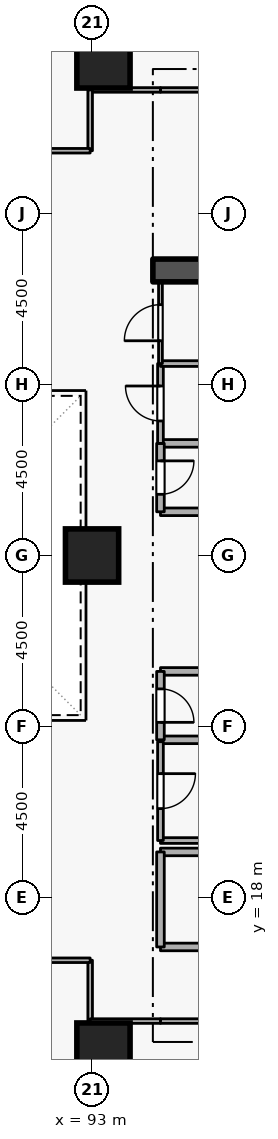
"""IFC4 building model, lengths in metres.
Left out: names, types, materials, properties, quantities, classifications, styles, units other than length and angle.
Written with IfcOpenShell. Run it as: python <this file> out.ifc"""

import sys

from ifc_helpers import new_model, si_unit, direction, frame, frame_2d, origin, origin_2d, place, context, subcontext, project, spatial, rectangle, extrude, element, fill, save


model = new_model("IFC4")
c1 = context("Model", 3, precision=1e-05, world=origin(), true_north=direction((0.0, 1.0)))
c2 = subcontext(c1, "Body", "Model", "MODEL_VIEW")
j1 = project(units=[si_unit("LENGTHUNIT", "METRE"), si_unit("PLANEANGLEUNIT", "RADIAN")], contexts=[c1])
p1 = place(None, origin())
s1 = spatial("IfcSite", under=j1, at=p1, CompositionType="ELEMENT")
p2 = place(p1, origin())
s2 = spatial("IfcBuilding", under=s1, at=p2, CompositionType="ELEMENT")
p3 = place(p2, frame((0.0, 0.0, 35.1)))
s3 = spatial("IfcBuildingStorey", under=s2, at=p3, CompositionType="ELEMENT", Elevation=35.1)
p4 = place(p3, frame((94.6, 34.5, 0.0), z_axis=(0.0, 0.0, 1.0), x_axis=(1.0, 0.0, 0.0)))
e1 = element("IfcWall", 1, at=p4, inside=s3, PredefinedType="SHEAR", context=c2, shape_type="SweptSolid", body=[
    extrude(rectangle(XDim=5.7, YDim=0.6, at=frame_2d((2.85, 0.0))), origin(), (0.0, 0.0, 1.0), 3.6),
])
for number, where, z_axis, x_axis in (
    (2, (93.3, 14.0, 0.0), (0.0, 0.0, 1.0), (1.0, 0.0, 0.0)),
    (3, (93.3, 40.0, 0.0), (0.0, 0.0, 1.0), (1.0, 0.0, 0.0)),
    (4, (93.0, 27.0, 0.0), (0.0, 0.0, 1.0), (1.0, 0.0, 0.0)),
):
    element("IfcColumn", number, at=place(p3, frame(where, z_axis=z_axis, x_axis=x_axis)), inside=s3, PredefinedType="COLUMN", context=c2, shape_type="SweptSolid", body=[
        extrude(rectangle(XDim=1.4, YDim=1.4, at=origin_2d()), origin(), (0.0, 0.0, 1.0), 3.6),
    ])
p5 = place(p3, frame((94.8, 16.7, 0.0), z_axis=(0.0, 0.0, 1.0), x_axis=(1.0, 0.0, 0.0)))
e5 = element("IfcWall", 5, at=p5, inside=s3, PredefinedType="STANDARD", context=c2, shape_type="SweptSolid", body=[
    extrude(rectangle(XDim=5.7, YDim=0.2, at=frame_2d((2.85, 0.0))), origin(), (0.0, 0.0, 1.0), 3.34),
])
p6 = place(p5, frame((2.275, 0.0, 0.0)))
e6 = element("IfcOpeningElement", 6, at=p6, cuts=e5, PredefinedType="OPENING", context=c2, shape_type="SweptSolid", body=[
    extrude(rectangle(XDim=1.15, YDim=2.1, at=frame_2d((0.575, 1.05))), frame((0.0, 0.11, 0.0), z_axis=(0.0, -1.0, 0.0), x_axis=(1.0, 0.0, 0.0)), (0.0, 0.0, 1.0), 0.22),
])
p7 = place(p3, frame((97.1, 19.2, 0.0), z_axis=(0.0, 0.0, 1.0), x_axis=(-1.0, 0.0, 0.0)))
e7 = element("IfcWall", 7, at=p7, inside=s3, PredefinedType="STANDARD", context=c2, shape_type="SweptSolid", body=[
    extrude(rectangle(XDim=2.3, YDim=0.2, at=frame_2d((1.15, 0.0))), origin(), (0.0, 0.0, 1.0), 2.545),
])
p8 = place(p3, frame((94.8, 19.2, 0.0), z_axis=(0.0, 0.0, 1.0), x_axis=(0.0, -1.0, 0.0)))
e8 = element("IfcWall", 8, at=p8, inside=s3, PredefinedType="STANDARD", context=c2, shape_type="SweptSolid", body=[
    extrude(rectangle(XDim=2.5, YDim=0.2, at=frame_2d((1.25, 0.0))), origin(), (0.0, 0.0, 1.0), 3.34),
])
for number, where, z_axis, x_axis in (
    (9, (94.8, 28.15, 0.0), (0.0, 0.0, 1.0), (1.0, 0.0, 0.0)),
    (10, (96.85, 29.95, 0.0), (0.0, 0.0, 1.0), (-1.0, 0.0, 0.0)),
):
    element("IfcWall", number, at=place(p3, frame(where, z_axis=z_axis, x_axis=x_axis)), inside=s3, PredefinedType="STANDARD", context=c2, shape_type="SweptSolid", body=[
        extrude(rectangle(XDim=2.05, YDim=0.2, at=frame_2d((1.025, 0.0))), origin(), (0.0, 0.0, 1.0), 3.34),
    ])
p9 = place(p3, frame((94.8, 29.95, 0.0), z_axis=(0.0, 0.0, 1.0), x_axis=(0.0, -1.0, 0.0)))
e11 = element("IfcWall", 11, at=p9, inside=s3, PredefinedType="STANDARD", context=c2, shape_type="SweptSolid", body=[
    extrude(rectangle(XDim=1.8, YDim=0.2, at=frame_2d((0.9, 0.0))), origin(), (0.0, 0.0, 1.0), 3.34),
])
p10 = place(p9, frame((0.46, 0.0, 0.0)))
e12 = element("IfcOpeningElement", 12, at=p10, cuts=e11, PredefinedType="OPENING", context=c2, shape_type="SweptSolid", body=[
    extrude(rectangle(XDim=0.88, YDim=2.04, at=frame_2d((0.44, 1.02))), frame((0.0, 0.11, 0.0), z_axis=(0.0, -1.0, 0.0), x_axis=(1.0, 0.0, 0.0)), (0.0, 0.0, 1.0), 0.22),
])
for number, where, z_axis, x_axis in (
    (13, (94.8, 22.15, 0.0), (0.0, 0.0, 1.0), (1.0, 0.0, 0.0)),
    (14, (96.85, 23.95, 0.0), (0.0, 0.0, 1.0), (-1.0, 0.0, 0.0)),
):
    element("IfcWall", number, at=place(p3, frame(where, z_axis=z_axis, x_axis=x_axis)), inside=s3, PredefinedType="STANDARD", context=c2, shape_type="SweptSolid", body=[
        extrude(rectangle(XDim=2.05, YDim=0.2, at=frame_2d((1.025, 0.0))), origin(), (0.0, 0.0, 1.0), 3.34),
    ])
p11 = place(p3, frame((94.8, 23.95, 0.0), z_axis=(0.0, 0.0, 1.0), x_axis=(0.0, -1.0, 0.0)))
e15 = element("IfcWall", 15, at=p11, inside=s3, PredefinedType="STANDARD", context=c2, shape_type="SweptSolid", body=[
    extrude(rectangle(XDim=1.8, YDim=0.2, at=frame_2d((0.9, 0.0))), origin(), (0.0, 0.0, 1.0), 3.34),
])
p12 = place(p11, frame((0.46, 0.0, 0.0)))
e16 = element("IfcOpeningElement", 16, at=p12, cuts=e15, PredefinedType="OPENING", context=c2, shape_type="SweptSolid", body=[
    extrude(rectangle(XDim=0.88, YDim=2.04, at=frame_2d((0.44, 1.02))), frame((0.0, 0.11, 0.0), z_axis=(0.0, -1.0, 0.0), x_axis=(1.0, 0.0, 0.0)), (0.0, 0.0, 1.0), 0.22),
])
p13 = place(p3, frame((94.8, 19.5, 0.0), z_axis=(0.0, 0.0, 1.0), x_axis=(1.0, 0.0, 0.0)))
e17 = element("IfcWall", 17, at=p13, inside=s3, PredefinedType="PARTITIONING", context=c2, shape_type="SweptSolid", body=[
    extrude(rectangle(XDim=2.05, YDim=0.15, at=frame_2d((1.025, 0.0))), origin(), (0.0, 0.0, 1.0), 2.545),
])
p14 = place(p3, frame((94.8, 22.1, 0.0), z_axis=(0.0, 0.0, 1.0), x_axis=(0.0, -1.0, 0.0)))
e18 = element("IfcWall", 18, at=p14, inside=s3, PredefinedType="PARTITIONING", context=c2, shape_type="SweptSolid", body=[
    extrude(rectangle(XDim=2.6, YDim=0.15, at=frame_2d((1.3, 0.0))), origin(), (0.0, 0.0, 1.0), 3.34),
])
p15 = place(p14, frame((0.84, 0.0, 0.0)))
e19 = element("IfcOpeningElement", 19, at=p15, cuts=e18, PredefinedType="OPENING", context=c2, shape_type="SweptSolid", body=[
    extrude(rectangle(XDim=0.92, YDim=2.08, at=frame_2d((0.46, 1.04))), frame((0.0, 0.085, 0.0), z_axis=(0.0, -1.0, 0.0), x_axis=(1.0, 0.0, 0.0)), (0.0, 0.0, 1.0), 0.17),
])
p16 = place(p3, frame((94.8, 29.95, 0.0), z_axis=(0.0, 0.0, 1.0), x_axis=(0.0, 1.0, 0.0)))
e20 = element("IfcWall", 20, at=p16, inside=s3, PredefinedType="PARTITIONING", context=c2, shape_type="SweptSolid", body=[
    extrude(rectangle(XDim=2.1, YDim=0.15, at=frame_2d((1.05, 0.0))), origin(), (0.0, 0.0, 1.0), 3.34),
])
p17 = place(p16, frame((0.59, 0.0, 0.0)))
e21 = element("IfcOpeningElement", 21, at=p17, cuts=e20, PredefinedType="OPENING", context=c2, shape_type="SweptSolid", body=[
    extrude(rectangle(XDim=0.92, YDim=2.08, at=frame_2d((0.46, 1.04))), frame((0.0, 0.085, 0.0), z_axis=(0.0, -1.0, 0.0), x_axis=(1.0, 0.0, 0.0)), (0.0, 0.0, 1.0), 0.17),
])
p18 = place(p3, frame((94.8, 32.05, 0.0), z_axis=(0.0, 0.0, 1.0), x_axis=(1.0, 0.0, 0.0)))
e22 = element("IfcWall", 22, at=p18, inside=s3, PredefinedType="PARTITIONING", context=c2, shape_type="SweptSolid", body=[
    extrude(rectangle(XDim=2.05, YDim=0.15, at=frame_2d((1.025, 0.0))), origin(), (0.0, 0.0, 1.0), 3.34),
])
p19 = place(p3, frame((94.8, 32.05, 0.0), z_axis=(0.0, 0.0, 1.0), x_axis=(0.0, 1.0, 0.0)))
e23 = element("IfcWall", 23, at=p19, inside=s3, PredefinedType="PARTITIONING", context=c2, shape_type="SweptSolid", body=[
    extrude(rectangle(XDim=2.15, YDim=0.1, at=frame_2d((1.075, 0.0))), origin(), (0.0, 0.0, 1.0), 3.34),
])
p20 = place(p19, frame((0.6, 0.0, 0.0)))
e24 = element("IfcOpeningElement", 24, at=p20, cuts=e23, PredefinedType="OPENING", context=c2, shape_type="SweptSolid", body=[
    extrude(rectangle(XDim=0.95, YDim=2.1, at=frame_2d((0.475, 1.05))), frame((0.0, 0.06, 0.0), z_axis=(0.0, -1.0, 0.0), x_axis=(1.0, 0.0, 0.0)), (0.0, 0.0, 1.0), 0.12),
])
p21 = place(p3, frame((92.95, 16.35, 0.0), z_axis=(0.0, 0.0, 1.0), x_axis=(0.0, -1.0, 0.0)))
e25 = element("IfcWall", 25, at=p21, inside=s3, PredefinedType="PARTITIONING", context=c2, shape_type="SweptSolid", body=[
    extrude(rectangle(XDim=1.6, YDim=0.12, at=frame_2d((0.8, 0.0))), origin(), (0.0, 0.0, 1.0), 3.34),
])
p22 = place(p3, frame((92.95, 14.75, 0.0), z_axis=(0.0, 0.0, 1.0), x_axis=(1.0, 0.0, 0.0)))
e26 = element("IfcWall", 26, at=p22, inside=s3, PredefinedType="PARTITIONING", context=c2, shape_type="SweptSolid", body=[
    extrude(rectangle(XDim=1.85, YDim=0.12, at=frame_2d((0.925, 0.0))), origin(), (0.0, 0.0, 1.0), 3.34),
])
p23 = place(p3, frame((94.8, 14.75, 0.0), z_axis=(0.0, 0.0, 1.0), x_axis=(1.0, 0.0, 0.0)))
e27 = element("IfcWall", 27, at=p23, inside=s3, PredefinedType="PARTITIONING", context=c2, shape_type="SweptSolid", body=[
    extrude(rectangle(XDim=9.35, YDim=0.12, at=frame_2d((4.675, 0.0))), origin(), (0.0, 0.0, 1.0), 3.34),
])
p24 = place(p23, frame((4.15, 0.0, 0.0)))
e28 = element("IfcOpeningElement", 28, at=p24, cuts=e27, PredefinedType="OPENING", context=c2, shape_type="SweptSolid", body=[
    extrude(rectangle(XDim=1.05, YDim=2.1, at=frame_2d((0.525, 1.05))), frame((0.0, 0.07, 0.0), z_axis=(0.0, -1.0, 0.0), x_axis=(1.0, 0.0, 0.0)), (0.0, 0.0, 1.0), 0.14),
])
p25 = place(p3, frame((88.5, 16.35, 0.0), z_axis=(0.0, 0.0, 1.0), x_axis=(1.0, 0.0, 0.0)))
e29 = element("IfcWall", 29, at=p25, inside=s3, PredefinedType="PARTITIONING", context=c2, shape_type="SweptSolid", body=[
    extrude(rectangle(XDim=4.45, YDim=0.12, at=frame_2d((2.225, 0.0))), origin(), (0.0, 0.0, 1.0), 3.34),
])
p26 = place(p3, frame((97.95, 39.25, 0.0), z_axis=(0.0, 0.0, 1.0), x_axis=(-1.0, 0.0, 0.0)))
e30 = element("IfcWall", 30, at=p26, inside=s3, PredefinedType="PARTITIONING", context=c2, shape_type="SweptSolid", body=[
    extrude(rectangle(XDim=3.15, YDim=0.12, at=frame_2d((1.575, 0.0))), origin(), (0.0, 0.0, 1.0), 3.34),
])
p27 = place(p3, frame((94.8, 39.25, 0.0), z_axis=(0.0, 0.0, 1.0), x_axis=(-1.0, 0.0, 0.0)))
e31 = element("IfcWall", 31, at=p27, inside=s3, PredefinedType="PARTITIONING", context=c2, shape_type="SweptSolid", body=[
    extrude(rectangle(XDim=1.85, YDim=0.12, at=frame_2d((0.925, 0.0))), origin(), (0.0, 0.0, 1.0), 3.34),
])
p28 = place(p3, frame((92.95, 39.25, 0.0), z_axis=(0.0, 0.0, 1.0), x_axis=(0.0, -1.0, 0.0)))
e32 = element("IfcWall", 32, at=p28, inside=s3, PredefinedType="PARTITIONING", context=c2, shape_type="SweptSolid", body=[
    extrude(rectangle(XDim=1.6, YDim=0.12, at=frame_2d((0.8, 0.0))), origin(), (0.0, 0.0, 1.0), 3.34),
])
p29 = place(p3, frame((92.95, 37.65, 0.0), z_axis=(0.0, 0.0, 1.0), x_axis=(-1.0, 0.0, 0.0)))
e33 = element("IfcWall", 33, at=p29, inside=s3, PredefinedType="PARTITIONING", context=c2, shape_type="SweptSolid", body=[
    extrude(rectangle(XDim=4.45, YDim=0.12, at=frame_2d((2.225, 0.0))), origin(), (0.0, 0.0, 1.0), 3.34),
])
p30 = place(p29, frame((1.7, 0.0, 0.0)))
e34 = element("IfcOpeningElement", 34, at=p30, cuts=e33, PredefinedType="OPENING", context=c2, shape_type="SweptSolid", body=[
    extrude(rectangle(XDim=1.05, YDim=2.1, at=frame_2d((0.525, 1.05))), frame((0.0, 0.07, 0.0), z_axis=(0.0, -1.0, 0.0), x_axis=(1.0, 0.0, 0.0)), (0.0, 0.0, 1.0), 0.14),
])
p31 = place(p10, origin())
e35 = element("IfcDoor", 35, at=p31, inside=s3, OperationType="SINGLE_SWING_LEFT", PredefinedType="DOOR", context=c2, shape_type="SweptSolid", body=[
    extrude(rectangle(XDim=0.88, YDim=2.04, at=frame_2d((0.44, 1.02))), frame((0.0, 0.025, 0.0), z_axis=(0.0, -1.0, 0.0), x_axis=(1.0, 0.0, 0.0)), (0.0, 0.0, 1.0), 0.05),
])
fill(e12, e35)
p32 = place(p12, origin())
e36 = element("IfcDoor", 36, at=p32, inside=s3, OperationType="SINGLE_SWING_RIGHT", PredefinedType="DOOR", context=c2, shape_type="SweptSolid", body=[
    extrude(rectangle(XDim=0.88, YDim=2.04, at=frame_2d((0.44, 1.02))), frame((0.0, 0.025, 0.0), z_axis=(0.0, -1.0, 0.0), x_axis=(1.0, 0.0, 0.0)), (0.0, 0.0, 1.0), 0.05),
])
fill(e16, e36)
p33 = place(p15, origin())
e37 = element("IfcDoor", 37, at=p33, inside=s3, OperationType="SINGLE_SWING_LEFT", PredefinedType="DOOR", context=c2, shape_type="SweptSolid", body=[
    extrude(rectangle(XDim=0.92, YDim=2.08, at=frame_2d((0.46, 1.04))), frame((0.0, 0.025, 0.0), z_axis=(0.0, -1.0, 0.0), x_axis=(1.0, 0.0, 0.0)), (0.0, 0.0, 1.0), 0.05),
])
fill(e19, e37)
p34 = place(p17, origin())
e38 = element("IfcDoor", 38, at=p34, inside=s3, OperationType="SINGLE_SWING_RIGHT", PredefinedType="DOOR", context=c2, shape_type="SweptSolid", body=[
    extrude(rectangle(XDim=0.92, YDim=2.08, at=frame_2d((0.46, 1.04))), frame((0.0, 0.025, 0.0), z_axis=(0.0, -1.0, 0.0), x_axis=(1.0, 0.0, 0.0)), (0.0, 0.0, 1.0), 0.05),
])
fill(e21, e38)
p35 = place(p20, origin())
e39 = element("IfcDoor", 39, at=p35, inside=s3, OperationType="SINGLE_SWING_LEFT", PredefinedType="DOOR", context=c2, shape_type="SweptSolid", body=[
    extrude(rectangle(XDim=0.95, YDim=2.1, at=frame_2d((0.475, 1.05))), frame((0.0, 0.025, 0.0), z_axis=(0.0, -1.0, 0.0), x_axis=(1.0, 0.0, 0.0)), (0.0, 0.0, 1.0), 0.05),
])
fill(e24, e39)
save(model, sys.argv[1])
